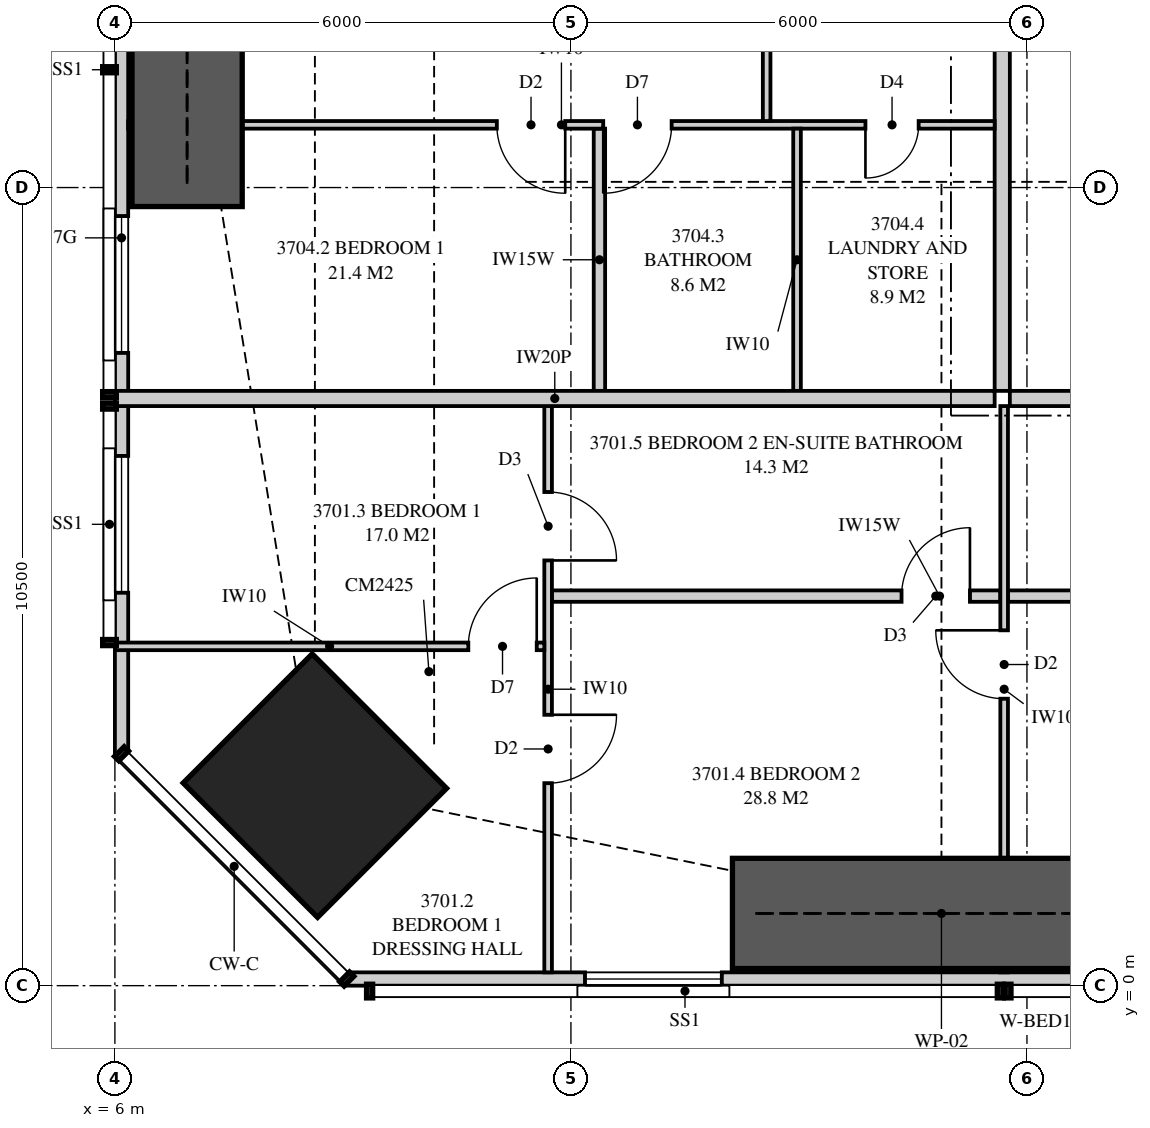
"""IFC4 building model, lengths in metres.
Left out: names, types, materials, properties, quantities, classifications, styles, units other than length and angle.
Written with IfcOpenShell. Run it as: python <this file> out.ifc"""

import sys

from ifc_helpers import new_model, si_unit, direction, frame, frame_2d, origin, origin_2d, place, context, subcontext, project, spatial, polyline, rectangle, outline, extrude, element, fill, save


model = new_model("IFC4")
c1 = context("Model", 3, precision=1e-05, world=origin(), true_north=direction((0.0, 1.0)))
c2 = subcontext(c1, "Body", "Model", "MODEL_VIEW")
j1 = project(units=[si_unit("LENGTHUNIT", "METRE"), si_unit("PLANEANGLEUNIT", "RADIAN")], contexts=[c1])
p1 = place(None, origin())
s1 = spatial("IfcSite", under=j1, at=p1, CompositionType="ELEMENT")
p2 = place(p1, origin())
s2 = spatial("IfcBuilding", under=s1, at=p2, CompositionType="ELEMENT")
p3 = place(p2, frame((0.0, 0.0, 135.0)))
s3 = spatial("IfcBuildingStorey", under=s2, at=p3, CompositionType="ELEMENT", Elevation=135.0)
p4 = place(p3, frame((8.631, 2.631, 0.0), z_axis=(0.0, 0.0, 1.0), x_axis=(0.707106781187, 0.707106781187, 0.0)))
e1 = element("IfcColumn", 1, at=p4, inside=s3, PredefinedType="COLUMN", context=c2, shape_type="SweptSolid", body=[
    extrude(rectangle(XDim=2.4, YDim=2.5, at=origin_2d()), origin(), (0.0, 0.0, 1.0), 3.35),
])
p5 = place(p3, frame((9.051, 0.087, 0.0), z_axis=(0.0, 0.0, 1.0), x_axis=(1.0, 0.0, 0.0)))
e2 = element("IfcWall", 2, at=p5, inside=s3, PredefinedType="SOLIDWALL", context=c2, shape_type="SweptSolid", body=[
    extrude(outline(polyline([(0.0, 0.0), (22.324, 0.0), (22.324, 2.15), (7.824, 2.15), (7.824, 3.11), (7.666, 3.11), (7.666, 2.15), (7.62, 2.15), (7.62, 3.11), (0.0, 3.11), (0.0, 0.0)])), frame((0.0, 0.087, 0.0), z_axis=(0.0, -1.0, 0.0), x_axis=(1.0, 0.0, 0.0)), (0.0, 0.0, 1.0), 0.175),
])
p6 = place(p5, frame((3.134, 0.0, 0.4)))
e3 = element("IfcOpeningElement", 3, at=p6, cuts=e2, PredefinedType="OPENING", context=c2, shape_type="SweptSolid", body=[
    extrude(rectangle(XDim=1.8, YDim=1.7, at=frame_2d((0.9, 0.85))), frame((0.0, 0.097, 0.0), z_axis=(0.0, -1.0, 0.0), x_axis=(1.0, 0.0, 0.0)), (0.0, 0.0, 1.0), 0.195),
])
p7 = place(p5, frame((10.706, 0.0, 0.4)))
e4 = element("IfcOpeningElement", 4, at=p7, cuts=e2, PredefinedType="OPENING", context=c2, shape_type="SweptSolid", body=[
    extrude(rectangle(XDim=1.8, YDim=1.7, at=frame_2d((0.9, 0.85))), frame((0.0, 0.097, 0.0), z_axis=(0.0, -1.0, 0.0), x_axis=(1.0, 0.0, 0.0)), (0.0, 0.0, 1.0), 0.195),
])
p8 = place(p5, frame((13.874, 0.0, 0.4)))
e5 = element("IfcOpeningElement", 5, at=p8, cuts=e2, PredefinedType="OPENING", context=c2, shape_type="SweptSolid", body=[
    extrude(rectangle(XDim=1.8, YDim=1.7, at=frame_2d((0.9, 0.85))), frame((0.0, 0.097, 0.0), z_axis=(0.0, -1.0, 0.0), x_axis=(1.0, 0.0, 0.0)), (0.0, 0.0, 1.0), 0.195),
])
p9 = place(p3, frame((6.087, 16.625, 0.0), z_axis=(0.0, 0.0, 1.0), x_axis=(0.0, -1.0, 0.0)))
e6 = element("IfcWall", 6, at=p9, inside=s3, PredefinedType="SOLIDWALL", context=c2, shape_type="SweptSolid", body=[
    extrude(outline(polyline([(0.0, 0.0), (13.574, 0.0), (13.574, 3.11), (3.844, 3.11), (3.844, 2.15), (3.751, 2.15), (3.751, 3.11), (3.625, 3.11), (3.625, 2.15), (0.0, 2.15), (0.0, 0.0)])), frame((0.0, 0.087, 0.0), z_axis=(0.0, -1.0, 0.0), x_axis=(1.0, 0.0, 0.0)), (0.0, 0.0, 1.0), 0.175),
])
p10 = place(p9, frame((6.5, 0.0, 0.4)))
e7 = element("IfcOpeningElement", 7, at=p10, cuts=e6, PredefinedType="OPENING", context=c2, shape_type="SweptSolid", body=[
    extrude(rectangle(XDim=1.8, YDim=1.7, at=frame_2d((0.9, 0.85))), frame((0.0, 0.097, 0.0), z_axis=(0.0, -1.0, 0.0), x_axis=(1.0, 0.0, 0.0)), (0.0, 0.0, 1.0), 0.195),
])
p11 = place(p9, frame((9.656, 0.0, 0.4)))
e8 = element("IfcOpeningElement", 8, at=p11, cuts=e6, PredefinedType="OPENING", context=c2, shape_type="SweptSolid", body=[
    extrude(rectangle(XDim=1.8, YDim=1.7, at=frame_2d((0.9, 0.85))), frame((0.0, 0.097, 0.0), z_axis=(0.0, -1.0, 0.0), x_axis=(1.0, 0.0, 0.0)), (0.0, 0.0, 1.0), 0.195),
])
p12 = place(p3, frame((17.775, 7.725, 0.0), z_axis=(0.0, 0.0, 1.0), x_axis=(1.0, 0.0, 0.0)))
e9 = element("IfcWall", 9, at=p12, inside=s3, PredefinedType="PARTITIONING", context=c2, shape_type="SweptSolid", body=[
    extrude(outline(polyline([(0.0, 0.0), (22.325, 0.0), (22.325, 3.11), (21.187, 3.11), (21.187, 2.541), (20.513, 2.541), (20.513, 3.11), (10.312, 3.11), (10.312, 2.541), (9.638, 2.541), (9.638, 3.11), (0.0, 3.11), (0.0, 0.0)])), frame((0.0, 0.1, 0.0), z_axis=(0.0, -1.0, 0.0), x_axis=(1.0, 0.0, 0.0)), (0.0, 0.0, 1.0), 0.2),
])
p13 = place(p12, frame((4.825, 0.0, 0.0)))
e10 = element("IfcOpeningElement", 10, at=p13, cuts=e9, PredefinedType="OPENING", context=c2, shape_type="SweptSolid", body=[
    extrude(rectangle(XDim=1.05, YDim=2.2, at=frame_2d((0.525, 1.1))), frame((0.0, 0.11, 0.0), z_axis=(0.0, -1.0, 0.0), x_axis=(1.0, 0.0, 0.0)), (0.0, 0.0, 1.0), 0.22),
])
p14 = place(p3, frame((11.7, 0.175, 0.0), z_axis=(0.0, 0.0, 1.0), x_axis=(0.0, 1.0, 0.0)))
e11 = element("IfcWall", 11, at=p14, inside=s3, PredefinedType="PARTITIONING", context=c2, shape_type="SweptSolid", body=[
    extrude(outline(polyline([(0.0, 0.0), (7.45, 0.0), (7.45, 3.11), (2.708, 3.11), (2.708, 2.15), (0.953, 2.15), (0.953, 3.11), (0.0, 3.11), (0.0, 0.0)])), frame((0.0, 0.05, 0.0), z_axis=(0.0, -1.0, 0.0), x_axis=(1.0, 0.0, 0.0)), (0.0, 0.0, 1.0), 0.1),
])
p15 = place(p14, frame((2.489, 0.0, 0.0)))
e12 = element("IfcOpeningElement", 12, at=p15, cuts=e11, PredefinedType="OPENING", context=c2, shape_type="SweptSolid", body=[
    extrude(rectangle(XDim=0.9, YDim=2.1, at=frame_2d((0.45, 1.05))), frame((0.0, 0.06, 0.0), z_axis=(0.0, -1.0, 0.0), x_axis=(1.0, 0.0, 0.0)), (0.0, 0.0, 1.0), 0.12),
])
p16 = place(p14, frame((5.419, 0.0, 0.0)))
e13 = element("IfcOpeningElement", 13, at=p16, cuts=e11, PredefinedType="OPENING", context=c2, shape_type="SweptSolid", body=[
    extrude(rectangle(XDim=0.9, YDim=2.1, at=frame_2d((0.45, 1.05))), frame((0.0, 0.06, 0.0), z_axis=(0.0, -1.0, 0.0), x_axis=(1.0, 0.0, 0.0)), (0.0, 0.0, 1.0), 0.12),
])
p17 = place(p3, frame((17.7, 0.175, 0.0), z_axis=(0.0, 0.0, 1.0), x_axis=(0.0, 1.0, 0.0)))
e14 = element("IfcWall", 14, at=p17, inside=s3, PredefinedType="PARTITIONING", context=c2, shape_type="SweptSolid", body=[
    extrude(outline(polyline([(1.635, 2.15), (0.0, 2.15), (0.0, 0.0), (7.45, 0.0), (7.45, 3.11), (1.635, 3.11), (1.635, 2.15)]), holes=[polyline([(1.021, 0.116), (0.529, 0.116), (0.529, 0.906), (1.021, 0.906), (1.021, 0.116)]), polyline([(1.021, 1.244), (0.529, 1.244), (0.529, 2.034), (1.021, 2.034), (1.021, 1.244)])]), frame((0.0, 0.05, 0.0), z_axis=(0.0, -1.0, 0.0), x_axis=(1.0, 0.0, 0.0)), (0.0, 0.0, 1.0), 0.1),
])
p18 = place(p17, frame((3.6, 0.0, 0.0)))
e15 = element("IfcOpeningElement", 15, at=p18, cuts=e14, PredefinedType="OPENING", context=c2, shape_type="SweptSolid", body=[
    extrude(rectangle(XDim=0.9, YDim=2.1, at=frame_2d((0.45, 1.05))), frame((0.0, 0.06, 0.0), z_axis=(0.0, -1.0, 0.0), x_axis=(1.0, 0.0, 0.0)), (0.0, 0.0, 1.0), 0.12),
])
p19 = place(p3, frame((6.0, 4.464, 0.0), z_axis=(0.0, 0.0, 1.0), x_axis=(1.0, 0.0, 0.0)))
e16 = element("IfcWall", 16, at=p19, inside=s3, PredefinedType="PARTITIONING", context=c2, shape_type="SweptSolid", body=[
    extrude(outline(polyline([(0.0, 0.0), (5.65, 0.0), (5.65, 3.11), (5.46, 3.11), (5.46, 2.51), (3.206, 2.51), (3.206, 2.15), (1.463, 2.15), (1.463, 3.11), (0.0, 3.11), (0.0, 0.0)])), frame((0.0, 0.05, 0.0), z_axis=(0.0, -1.0, 0.0), x_axis=(1.0, 0.0, 0.0)), (0.0, 0.0, 1.0), 0.1),
])
p20 = place(p19, frame((4.65, 0.0, 0.0)))
e17 = element("IfcOpeningElement", 17, at=p20, cuts=e16, PredefinedType="OPENING", context=c2, shape_type="SweptSolid", body=[
    extrude(rectangle(XDim=0.9, YDim=2.1, at=frame_2d((0.45, 1.05))), frame((0.0, 0.06, 0.0), z_axis=(0.0, -1.0, 0.0), x_axis=(1.0, 0.0, 0.0)), (0.0, 0.0, 1.0), 0.12),
])
p21 = place(p3, frame((11.75, 5.125, 0.0), z_axis=(0.0, 0.0, 1.0), x_axis=(1.0, 0.0, 0.0)))
e18 = element("IfcWall", 18, at=p21, inside=s3, PredefinedType="PLUMBINGWALL", context=c2, shape_type="SweptSolid", body=[
    extrude(outline(polyline([(0.0, 0.0), (5.9, 0.0), (5.9, 3.11), (5.438, 3.11), (5.438, 2.541), (4.812, 2.541), (4.812, 3.11), (0.0, 3.11), (0.0, 0.0)])), frame((0.0, 0.075, 0.0), z_axis=(0.0, -1.0, 0.0), x_axis=(1.0, 0.0, 0.0)), (0.0, 0.0, 1.0), 0.15),
])
p22 = place(p21, frame((4.6, 0.0, 0.0)))
e19 = element("IfcOpeningElement", 19, at=p22, cuts=e18, PredefinedType="OPENING", context=c2, shape_type="SweptSolid", body=[
    extrude(rectangle(XDim=0.9, YDim=2.1, at=frame_2d((0.45, 1.05))), frame((0.0, 0.085, 0.0), z_axis=(0.0, -1.0, 0.0), x_axis=(1.0, 0.0, 0.0)), (0.0, 0.0, 1.0), 0.17),
])
p23 = place(p3, frame((17.75, 5.125, 0.0), z_axis=(0.0, 0.0, 1.0), x_axis=(1.0, 0.0, 0.0)))
e20 = element("IfcWall", 20, at=p23, inside=s3, PredefinedType="PLUMBINGWALL", context=c2, shape_type="SweptSolid", body=[
    extrude(rectangle(XDim=4.2, YDim=0.15, at=frame_2d((2.1, 0.0))), origin(), (0.0, 0.0, 1.0), 3.11),
])
p24 = place(p3, frame((6.0, 7.725, 0.0), z_axis=(0.0, 0.0, 1.0), x_axis=(1.0, 0.0, 0.0)))
e21 = element("IfcWall", 21, at=p24, inside=s3, PredefinedType="PARTITIONING", context=c2, shape_type="SweptSolid", body=[
    extrude(outline(polyline([(0.0, 0.0), (11.575, 0.0), (11.575, 3.11), (11.212, 3.11), (11.212, 2.541), (10.538, 2.541), (10.538, 3.11), (5.51, 3.11), (5.51, 2.51), (2.969, 2.51), (2.969, 2.541), (2.727, 2.541), (2.727, 2.15), (0.884, 2.15), (0.884, 3.11), (0.0, 3.11), (0.0, 0.0)])), frame((0.0, 0.1, 0.0), z_axis=(0.0, -1.0, 0.0), x_axis=(1.0, 0.0, 0.0)), (0.0, 0.0, 1.0), 0.2),
])
p25 = place(p3, frame((17.675, 7.825, 0.0), z_axis=(0.0, 0.0, 1.0), x_axis=(0.0, 1.0, 0.0)))
e22 = element("IfcWall", 22, at=p25, inside=s3, PredefinedType="PARTITIONING", context=c2, shape_type="SweptSolid", body=[
    extrude(outline(polyline([(0.0, 0.0), (15.425, 0.0), (15.425, 3.11), (3.087, 3.11), (3.087, 2.541), (2.413, 2.541), (2.413, 3.11), (0.0, 3.11), (0.0, 0.0)])), frame((0.0, 0.1, 0.0), z_axis=(0.0, -1.0, 0.0), x_axis=(1.0, 0.0, 0.0)), (0.0, 0.0, 1.0), 0.2),
])
p26 = place(p25, frame((7.212, 0.0, 0.0)))
e23 = element("IfcOpeningElement", 23, at=p26, cuts=e22, PredefinedType="OPENING", context=c2, shape_type="SweptSolid", body=[
    extrude(rectangle(XDim=1.05, YDim=2.2, at=frame_2d((0.525, 1.1))), frame((0.0, 0.11, 0.0), z_axis=(0.0, -1.0, 0.0), x_axis=(1.0, 0.0, 0.0)), (0.0, 0.0, 1.0), 0.22),
])
p27 = place(p3, frame((6.175, 11.325, 0.0), z_axis=(0.0, 0.0, 1.0), x_axis=(1.0, 0.0, 0.0)))
e24 = element("IfcWall", 24, at=p27, inside=s3, PredefinedType="PARTITIONING", context=c2, shape_type="SweptSolid", body=[
    extrude(outline(polyline([(0.175, 3.11), (0.0, 3.11), (0.0, 0.0), (0.529, 0.0), (0.529, 0.325), (1.021, 0.325), (1.021, 0.0), (11.4, 0.0), (11.4, 3.11), (5.285, 3.11), (5.285, 2.51), (2.765, 2.51), (2.765, 3.11), (2.744, 3.11), (2.744, 2.541), (2.169, 2.541), (2.169, 3.11), (1.918, 3.11), (1.918, 2.15), (1.021, 2.15), (1.021, 1.825), (0.529, 1.825), (0.529, 2.15), (0.175, 2.15), (0.175, 3.11)])), frame((0.0, 0.05, 0.0), z_axis=(0.0, -1.0, 0.0), x_axis=(1.0, 0.0, 0.0)), (0.0, 0.0, 1.0), 0.1),
])
p28 = place(p27, frame((4.85, 0.0, 0.0)))
e25 = element("IfcOpeningElement", 25, at=p28, cuts=e24, PredefinedType="OPENING", context=c2, shape_type="SweptSolid", body=[
    extrude(rectangle(XDim=0.9, YDim=2.1, at=frame_2d((0.45, 1.05))), frame((0.0, 0.06, 0.0), z_axis=(0.0, -1.0, 0.0), x_axis=(1.0, 0.0, 0.0)), (0.0, 0.0, 1.0), 0.12),
])
p29 = place(p27, frame((6.25, 0.0, 0.0)))
e26 = element("IfcOpeningElement", 26, at=p29, cuts=e24, PredefinedType="OPENING", context=c2, shape_type="SweptSolid", body=[
    extrude(rectangle(XDim=0.9, YDim=2.1, at=frame_2d((0.45, 1.05))), frame((0.0, 0.06, 0.0), z_axis=(0.0, -1.0, 0.0), x_axis=(1.0, 0.0, 0.0)), (0.0, 0.0, 1.0), 0.12),
])
p30 = place(p27, frame((9.7, 0.0, 0.0)))
e27 = element("IfcOpeningElement", 27, at=p30, cuts=e24, PredefinedType="OPENING", context=c2, shape_type="SweptSolid", body=[
    extrude(rectangle(XDim=0.7, YDim=2.1, at=frame_2d((0.35, 1.05))), frame((0.0, 0.06, 0.0), z_axis=(0.0, -1.0, 0.0), x_axis=(1.0, 0.0, 0.0)), (0.0, 0.0, 1.0), 0.12),
])
p31 = place(p3, frame((12.375, 7.825, 0.0), z_axis=(0.0, 0.0, 1.0), x_axis=(0.0, 1.0, 0.0)))
e28 = element("IfcWall", 28, at=p31, inside=s3, PredefinedType="PLUMBINGWALL", context=c2, shape_type="SweptSolid", body=[
    extrude(outline(polyline([(0.0, 0.0), (3.45, 0.0), (3.45, 3.11), (3.062, 3.11), (3.062, 2.541), (2.438, 2.541), (2.438, 3.11), (0.0, 3.11), (0.0, 0.0)])), frame((0.0, 0.075, 0.0), z_axis=(0.0, -1.0, 0.0), x_axis=(1.0, 0.0, 0.0)), (0.0, 0.0, 1.0), 0.15),
])
p32 = place(p3, frame((14.975, 7.825, 0.0), z_axis=(0.0, 0.0, 1.0), x_axis=(0.0, 1.0, 0.0)))
e29 = element("IfcWall", 29, at=p32, inside=s3, PredefinedType="PARTITIONING", context=c2, shape_type="SweptSolid", body=[
    extrude(outline(polyline([(0.0, 0.0), (3.45, 0.0), (3.45, 3.11), (3.037, 3.11), (3.037, 2.541), (2.463, 2.541), (2.463, 3.11), (0.0, 3.11), (0.0, 0.0)])), frame((0.0, 0.05, 0.0), z_axis=(0.0, -1.0, 0.0), x_axis=(1.0, 0.0, 0.0)), (0.0, 0.0, 1.0), 0.1),
])
p33 = place(p3, frame((14.575, 11.375, 0.0), z_axis=(0.0, 0.0, 1.0), x_axis=(0.0, 1.0, 0.0)))
e30 = element("IfcWall", 30, at=p33, inside=s3, PredefinedType="PARTITIONING", context=c2, shape_type="SweptSolid", body=[
    extrude(rectangle(XDim=3.25, YDim=0.1, at=frame_2d((1.625, 0.0))), origin(), (0.0, 0.0, 1.0), 3.11),
])
p34 = place(p33, frame((1.2, 0.0, 0.0)))
e31 = element("IfcOpeningElement", 31, at=p34, cuts=e30, PredefinedType="OPENING", context=c2, shape_type="SweptSolid", body=[
    extrude(rectangle(XDim=0.9, YDim=2.1, at=frame_2d((0.45, 1.05))), frame((0.0, 0.06, 0.0), z_axis=(0.0, -1.0, 0.0), x_axis=(1.0, 0.0, 0.0)), (0.0, 0.0, 1.0), 0.12),
])
for number, where, z_axis, x_axis in (
    (32, (14.125, 0.95, 0.0), (0.0, 0.0, 1.0), (1.0, 0.0, 0.0)),
    (33, (6.95, 10.25, 0.0), (0.0, 0.0, 1.0), (0.0, 1.0, 0.0)),
):
    element("IfcWall", number, at=place(p3, frame(where, z_axis=z_axis, x_axis=x_axis)), inside=s3, PredefinedType="SHEAR", context=c2, shape_type="SweptSolid", body=[
        extrude(rectangle(XDim=5.5, YDim=1.45, at=frame_2d((2.75, 0.0))), origin(), (0.0, 0.0, 1.0), 3.35),
    ])
p35 = place(p6, origin())
e34 = element("IfcWindow", 34, at=p35, inside=s3, PartitioningType="SINGLE_PANEL", PredefinedType="WINDOW", context=c2, shape_type="SweptSolid", body=[
    extrude(rectangle(XDim=1.8, YDim=1.7, at=frame_2d((0.9, 0.85))), frame((0.0, 0.03, 0.0), z_axis=(0.0, -1.0, 0.0), x_axis=(1.0, 0.0, 0.0)), (0.0, 0.0, 1.0), 0.06),
])
fill(e3, e34)
p36 = place(p10, origin())
e35 = element("IfcWindow", 35, at=p36, inside=s3, PartitioningType="SINGLE_PANEL", PredefinedType="WINDOW", context=c2, shape_type="SweptSolid", body=[
    extrude(rectangle(XDim=1.8, YDim=1.7, at=frame_2d((0.9, 0.85))), frame((0.0, 0.03, 0.0), z_axis=(0.0, -1.0, 0.0), x_axis=(1.0, 0.0, 0.0)), (0.0, 0.0, 1.0), 0.06),
])
fill(e7, e35)
p37 = place(p11, origin())
e36 = element("IfcWindow", 36, at=p37, inside=s3, PartitioningType="SINGLE_PANEL", PredefinedType="WINDOW", context=c2, shape_type="SweptSolid", body=[
    extrude(rectangle(XDim=1.8, YDim=1.7, at=frame_2d((0.9, 0.85))), frame((0.0, 0.03, 0.0), z_axis=(0.0, -1.0, 0.0), x_axis=(1.0, 0.0, 0.0)), (0.0, 0.0, 1.0), 0.06),
])
fill(e8, e36)
p38 = place(p20, origin())
e37 = element("IfcDoor", 37, at=p38, inside=s3, OperationType="SINGLE_SWING_RIGHT", PredefinedType="DOOR", context=c2, shape_type="SweptSolid", body=[
    extrude(rectangle(XDim=0.9, YDim=2.1, at=frame_2d((0.45, 1.05))), frame((0.0, 0.025, 0.0), z_axis=(0.0, -1.0, 0.0), x_axis=(1.0, 0.0, 0.0)), (0.0, 0.0, 1.0), 0.05),
])
fill(e17, e37)
p39 = place(p15, frame((0.9, 0.0, 0.0), z_axis=(0.0, 0.0, 1.0), x_axis=(-1.0, 0.0, 0.0)))
e38 = element("IfcDoor", 38, at=p39, inside=s3, OperationType="SINGLE_SWING_LEFT", PredefinedType="DOOR", context=c2, shape_type="SweptSolid", body=[
    extrude(rectangle(XDim=0.9, YDim=2.1, at=frame_2d((0.45, 1.05))), frame((0.0, 0.025, 0.0), z_axis=(0.0, -1.0, 0.0), x_axis=(1.0, 0.0, 0.0)), (0.0, 0.0, 1.0), 0.05),
])
fill(e12, e38)
p40 = place(p18, origin())
e39 = element("IfcDoor", 39, at=p40, inside=s3, OperationType="SINGLE_SWING_RIGHT", PredefinedType="DOOR", context=c2, shape_type="SweptSolid", body=[
    extrude(rectangle(XDim=0.9, YDim=2.1, at=frame_2d((0.45, 1.05))), frame((0.0, 0.025, 0.0), z_axis=(0.0, -1.0, 0.0), x_axis=(1.0, 0.0, 0.0)), (0.0, 0.0, 1.0), 0.05),
])
fill(e15, e39)
p41 = place(p22, origin())
e40 = element("IfcDoor", 40, at=p41, inside=s3, OperationType="SINGLE_SWING_RIGHT", PredefinedType="DOOR", context=c2, shape_type="SweptSolid", body=[
    extrude(rectangle(XDim=0.9, YDim=2.1, at=frame_2d((0.45, 1.05))), frame((0.0, 0.025, 0.0), z_axis=(0.0, -1.0, 0.0), x_axis=(1.0, 0.0, 0.0)), (0.0, 0.0, 1.0), 0.05),
])
fill(e19, e40)
p42 = place(p16, frame((0.9, 0.0, 0.0), z_axis=(0.0, 0.0, 1.0), x_axis=(-1.0, 0.0, 0.0)))
e41 = element("IfcDoor", 41, at=p42, inside=s3, OperationType="SINGLE_SWING_RIGHT", PredefinedType="DOOR", context=c2, shape_type="SweptSolid", body=[
    extrude(rectangle(XDim=0.9, YDim=2.1, at=frame_2d((0.45, 1.05))), frame((0.0, 0.025, 0.0), z_axis=(0.0, -1.0, 0.0), x_axis=(1.0, 0.0, 0.0)), (0.0, 0.0, 1.0), 0.05),
])
fill(e13, e41)
p43 = place(p28, frame((0.9, 0.0, 0.0), z_axis=(0.0, 0.0, 1.0), x_axis=(-1.0, 0.0, 0.0)))
e42 = element("IfcDoor", 42, at=p43, inside=s3, OperationType="SINGLE_SWING_LEFT", PredefinedType="DOOR", context=c2, shape_type="SweptSolid", body=[
    extrude(rectangle(XDim=0.9, YDim=2.1, at=frame_2d((0.45, 1.05))), frame((0.0, 0.025, 0.0), z_axis=(0.0, -1.0, 0.0), x_axis=(1.0, 0.0, 0.0)), (0.0, 0.0, 1.0), 0.05),
])
fill(e25, e42)
p44 = place(p29, frame((0.9, 0.0, 0.0), z_axis=(0.0, 0.0, 1.0), x_axis=(-1.0, 0.0, 0.0)))
e43 = element("IfcDoor", 43, at=p44, inside=s3, OperationType="SINGLE_SWING_RIGHT", PredefinedType="DOOR", context=c2, shape_type="SweptSolid", body=[
    extrude(rectangle(XDim=0.9, YDim=2.1, at=frame_2d((0.45, 1.05))), frame((0.0, 0.025, 0.0), z_axis=(0.0, -1.0, 0.0), x_axis=(1.0, 0.0, 0.0)), (0.0, 0.0, 1.0), 0.05),
])
fill(e26, e43)
p45 = place(p30, frame((0.7, 0.0, 0.0), z_axis=(0.0, 0.0, 1.0), x_axis=(-1.0, 0.0, 0.0)))
e44 = element("IfcDoor", 44, at=p45, inside=s3, OperationType="SINGLE_SWING_RIGHT", PredefinedType="DOOR", context=c2, shape_type="SweptSolid", body=[
    extrude(rectangle(XDim=0.7, YDim=2.1, at=frame_2d((0.35, 1.05))), frame((0.0, 0.025, 0.0), z_axis=(0.0, -1.0, 0.0), x_axis=(1.0, 0.0, 0.0)), (0.0, 0.0, 1.0), 0.05),
])
fill(e27, e44)
save(model, sys.argv[1])
